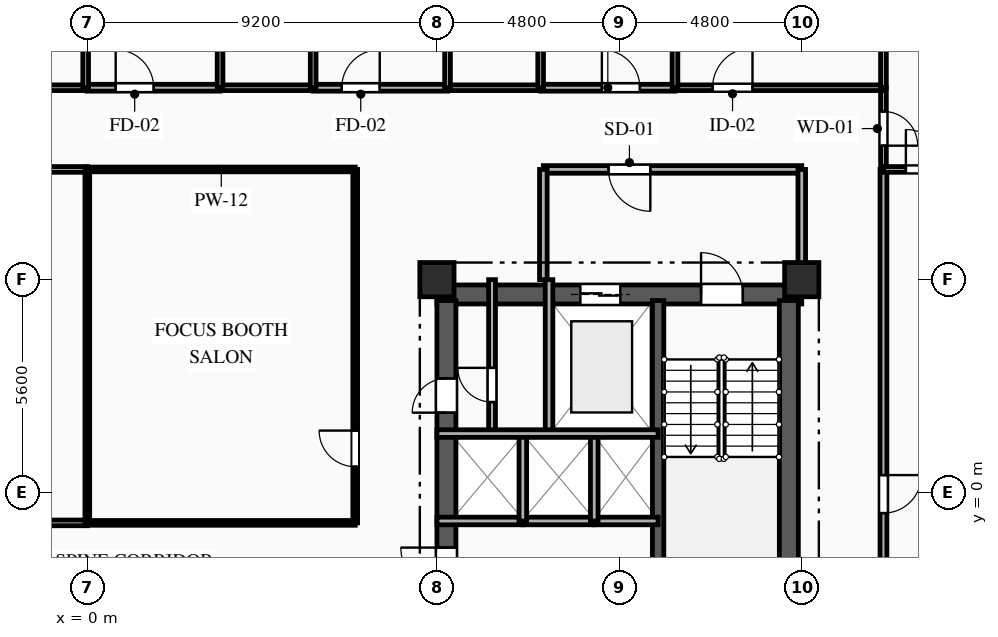
"""IFC4 building model, lengths in metres.
Left out: names, types, materials, properties, quantities, classifications, styles, units other than length and angle.
Written with IfcOpenShell. Run it as: python <this file> out.ifc"""

import sys

from ifc_helpers import new_model, si_unit, direction, frame, frame_2d, origin, origin_2d, place, context, subcontext, project, spatial, rectangle, extrude, element, fill, save


model = new_model("IFC4")
c1 = context("Model", 3, precision=1e-05, world=origin(), true_north=direction((0.0, 1.0)))
c2 = subcontext(c1, "Body", "Model", "MODEL_VIEW")
j1 = project(units=[si_unit("LENGTHUNIT", "METRE"), si_unit("PLANEANGLEUNIT", "RADIAN")], contexts=[c1])
p1 = place(None, origin())
s1 = spatial("IfcSite", under=j1, at=p1, CompositionType="ELEMENT")
p2 = place(p1, origin())
s2 = spatial("IfcBuilding", under=s1, at=p2, CompositionType="ELEMENT")
p3 = place(p2, frame((0.0, 0.0, 141.05)))
s3 = spatial("IfcBuildingStorey", under=s2, at=p3, CompositionType="ELEMENT", Elevation=141.05)
for number, where, z_axis, x_axis in (
    (1, (9.2, 5.6, 0.0), (0.0, 0.0, 1.0), (1.0, 0.0, 0.0)),
    (2, (18.8, 5.6, 0.0), (0.0, 0.0, 1.0), (1.0, 0.0, 0.0)),
):
    element("IfcColumn", number, at=place(p3, frame(where, z_axis=z_axis, x_axis=x_axis)), inside=s3, PredefinedType="COLUMN", context=c2, shape_type="SweptSolid", body=[
        extrude(rectangle(XDim=0.9, YDim=0.9, at=origin_2d()), origin(), (0.0, 0.0, 1.0), 3.35),
    ])
p4 = place(p3, frame((9.2, 5.21, 0.0), z_axis=(0.0, 0.0, 1.0), x_axis=(1.0, 0.0, 0.0)))
e3 = element("IfcWall", 3, at=p4, inside=s3, PredefinedType="SHEAR", context=c2, shape_type="SweptSolid", body=[
    extrude(rectangle(XDim=9.6, YDim=0.5, at=frame_2d((4.8, 0.0))), origin(), (0.0, 0.0, 1.0), 3.04),
])
p5 = place(p4, frame((6.95, 0.0, 0.0)))
e4 = element("IfcOpeningElement", 4, at=p5, cuts=e3, PredefinedType="OPENING", context=c2, shape_type="SweptSolid", body=[
    extrude(rectangle(XDim=1.1, YDim=2.15, at=frame_2d((0.55, 1.075))), frame((0.0, 0.26, 0.0), z_axis=(0.0, -1.0, 0.0), x_axis=(1.0, 0.0, 0.0)), (0.0, 0.0, 1.0), 0.52),
])
p6 = place(p4, frame((3.775, 0.0, 0.0)))
e5 = element("IfcOpeningElement", 5, at=p6, cuts=e3, PredefinedType="OPENING", context=c2, shape_type="SweptSolid", body=[
    extrude(rectangle(XDim=1.05, YDim=2.1, at=frame_2d((0.525, 1.05))), frame((0.0, 0.26, 0.0), z_axis=(0.0, -1.0, 0.0), x_axis=(1.0, 0.0, 0.0)), (0.0, 0.0, 1.0), 0.52),
])
p7 = place(p3, frame((9.45, -5.05, 0.0), z_axis=(0.0, 0.0, 1.0), x_axis=(0.0, 1.0, 0.0)))
e6 = element("IfcWall", 6, at=p7, inside=s3, PredefinedType="SHEAR", context=c2, shape_type="SweptSolid", body=[
    extrude(rectangle(XDim=10.1, YDim=0.5, at=frame_2d((5.05, 0.0))), origin(), (0.0, 0.0, 1.0), 3.04),
])
p8 = place(p7, frame((7.15, 0.0, 0.0)))
e7 = element("IfcOpeningElement", 7, at=p8, cuts=e6, PredefinedType="OPENING", context=c2, shape_type="SweptSolid", body=[
    extrude(rectangle(XDim=0.9, YDim=2.1, at=frame_2d((0.45, 1.05))), frame((0.0, 0.26, 0.0), z_axis=(0.0, -1.0, 0.0), x_axis=(1.0, 0.0, 0.0)), (0.0, 0.0, 1.0), 0.52),
])
p9 = place(p7, frame((2.4, 0.0, 0.0)))
e8 = element("IfcOpeningElement", 8, at=p9, cuts=e6, PredefinedType="OPENING", context=c2, shape_type="SweptSolid", body=[
    extrude(rectangle(XDim=1.2, YDim=2.15, at=frame_2d((0.6, 1.075))), frame((0.0, 0.26, 0.0), z_axis=(0.0, -1.0, 0.0), x_axis=(1.0, 0.0, 0.0)), (0.0, 0.0, 1.0), 0.52),
])
p10 = place(p3, frame((18.46, -5.05, 0.0), z_axis=(0.0, 0.0, 1.0), x_axis=(0.0, 1.0, 0.0)))
e9 = element("IfcWall", 9, at=p10, inside=s3, PredefinedType="SHEAR", context=c2, shape_type="SweptSolid", body=[
    extrude(rectangle(XDim=10.1, YDim=0.5, at=frame_2d((5.05, 0.0))), origin(), (0.0, 0.0, 1.0), 3.04),
])
p11 = place(p3, frame((15.02, -5.05, 0.0), z_axis=(0.0, 0.0, 1.0), x_axis=(0.0, 1.0, 0.0)))
e10 = element("IfcWall", 10, at=p11, inside=s3, PredefinedType="SHEAR", context=c2, shape_type="SweptSolid", body=[
    extrude(rectangle(XDim=10.1, YDim=0.3, at=frame_2d((5.05, 0.0))), origin(), (0.0, 0.0, 1.0), 3.04),
])
p12 = place(p3, frame((12.15, 5.6, 0.0), z_axis=(0.0, 0.0, 1.0), x_axis=(0.0, -1.0, 0.0)))
e11 = element("IfcWall", 11, at=p12, inside=s3, PredefinedType="PARTITIONING", context=c2, shape_type="SweptSolid", body=[
    extrude(rectangle(XDim=4.05, YDim=0.2, at=frame_2d((2.025, 0.0))), origin(), (0.0, 0.0, 1.0), 3.04),
])
p13 = place(p3, frame((18.8, 8.5, 0.0), z_axis=(0.0, 0.0, 1.0), x_axis=(-1.0, 0.0, 0.0)))
e12 = element("IfcWall", 12, at=p13, inside=s3, PredefinedType="PARTITIONING", context=c2, shape_type="SweptSolid", body=[
    extrude(rectangle(XDim=6.8, YDim=0.2, at=frame_2d((3.4, 0.0))), origin(), (0.0, 0.0, 1.0), 3.04),
])
p14 = place(p13, frame((3.985, 0.0, 0.0)))
e13 = element("IfcOpeningElement", 13, at=p14, cuts=e12, PredefinedType="OPENING", context=c2, shape_type="SweptSolid", body=[
    extrude(rectangle(XDim=1.1, YDim=2.15, at=frame_2d((0.55, 1.075))), frame((0.0, 0.11, 0.0), z_axis=(0.0, -1.0, 0.0), x_axis=(1.0, 0.0, 0.0)), (0.0, 0.0, 1.0), 0.22),
])
p15 = place(p3, frame((18.8, 5.6, 0.0), z_axis=(0.0, 0.0, 1.0), x_axis=(0.0, 1.0, 0.0)))
e14 = element("IfcWall", 14, at=p15, inside=s3, PredefinedType="PARTITIONING", context=c2, shape_type="SweptSolid", body=[
    extrude(rectangle(XDim=2.9, YDim=0.2, at=frame_2d((1.45, 0.0))), origin(), (0.0, 0.0, 1.0), 2.525),
])
p16 = place(p3, frame((12.0, 8.5, 0.0), z_axis=(0.0, 0.0, 1.0), x_axis=(0.0, -1.0, 0.0)))
e15 = element("IfcWall", 15, at=p16, inside=s3, PredefinedType="PARTITIONING", context=c2, shape_type="SweptSolid", body=[
    extrude(rectangle(XDim=2.9, YDim=0.2, at=frame_2d((1.45, 0.0))), origin(), (0.0, 0.0, 1.0), 3.04),
])
p17 = place(p3, frame((10.65, 1.55, 0.0), z_axis=(0.0, 0.0, 1.0), x_axis=(0.0, 1.0, 0.0)))
e16 = element("IfcWall", 16, at=p17, inside=s3, PredefinedType="PARTITIONING", context=c2, shape_type="SweptSolid", body=[
    extrude(rectangle(XDim=4.05, YDim=0.18, at=frame_2d((2.025, 0.0))), origin(), (0.0, 0.0, 1.0), 3.04),
])
p18 = place(p17, frame((0.829, 0.0, 0.0)))
e17 = element("IfcOpeningElement", 17, at=p18, cuts=e16, PredefinedType="OPENING", context=c2, shape_type="SweptSolid", body=[
    extrude(rectangle(XDim=0.9, YDim=2.1, at=frame_2d((0.45, 1.05))), frame((0.0, 0.1, 0.0), z_axis=(0.0, -1.0, 0.0), x_axis=(1.0, 0.0, 0.0)), (0.0, 0.0, 1.0), 0.2),
])
p19 = place(p3, frame((11.46, -0.75, 0.0), z_axis=(0.0, 0.0, 1.0), x_axis=(-1.0, 0.0, 0.0)))
e18 = element("IfcWall", 18, at=p19, inside=s3, PredefinedType="PARTITIONING", context=c2, shape_type="SweptSolid", body=[
    extrude(rectangle(XDim=2.26, YDim=0.2, at=frame_2d((1.13, 0.0))), origin(), (0.0, 0.0, 1.0), 3.04),
])
p20 = place(p3, frame((13.34, -0.75, 0.0), z_axis=(0.0, 0.0, 1.0), x_axis=(-1.0, 0.0, 0.0)))
e19 = element("IfcWall", 19, at=p20, inside=s3, PredefinedType="PARTITIONING", context=c2, shape_type="SweptSolid", body=[
    extrude(rectangle(XDim=1.88, YDim=0.2, at=frame_2d((0.94, 0.0))), origin(), (0.0, 0.0, 1.0), 3.04),
])
p21 = place(p3, frame((15.02, -0.75, 0.0), z_axis=(0.0, 0.0, 1.0), x_axis=(-1.0, 0.0, 0.0)))
e20 = element("IfcWall", 20, at=p21, inside=s3, PredefinedType="PARTITIONING", context=c2, shape_type="SweptSolid", body=[
    extrude(rectangle(XDim=1.68, YDim=0.2, at=frame_2d((0.84, 0.0))), origin(), (0.0, 0.0, 1.0), 3.04),
])
for number, where, z_axis, x_axis in (
    (21, (11.46, -0.75, 0.0), (0.0, 0.0, 1.0), (0.0, 1.0, 0.0)),
    (22, (13.34, -0.75, 0.0), (0.0, 0.0, 1.0), (0.0, 1.0, 0.0)),
):
    element("IfcWall", number, at=place(p3, frame(where, z_axis=z_axis, x_axis=x_axis)), inside=s3, PredefinedType="PARTITIONING", context=c2, shape_type="SweptSolid", body=[
        extrude(rectangle(XDim=2.3, YDim=0.2, at=frame_2d((1.15, 0.0))), origin(), (0.0, 0.0, 1.0), 3.04),
    ])
p22 = place(p3, frame((-2.493, 10.65, 0.0), z_axis=(0.0, 0.0, 1.0), x_axis=(1.0, 0.0, 0.0)))
e23 = element("IfcWall", 23, at=p22, inside=s3, PredefinedType="PLUMBINGWALL", context=c2, shape_type="SweptSolid", body=[
    extrude(rectangle(XDim=2.45, YDim=0.15, at=frame_2d((1.225, 0.0))), origin(), (0.0, 0.0, 1.0), 3.04),
])
p23 = place(p3, frame((0.0, 8.5, 0.0), z_axis=(0.0, 0.0, 1.0), x_axis=(-1.0, 0.0, 0.0)))
e24 = element("IfcWall", 24, at=p23, inside=s3, PredefinedType="PARTITIONING", context=c2, shape_type="SweptSolid", body=[
    extrude(rectangle(XDim=7.05, YDim=0.15, at=frame_2d((3.525, 0.0))), origin(), (0.0, 0.0, 1.0), 3.04),
])
p24 = place(p3, frame((20.95, 10.65, 0.0), z_axis=(0.0, 0.0, 1.0), x_axis=(0.0, -1.0, 0.0)))
e25 = element("IfcWall", 25, at=p24, inside=s3, PredefinedType="PARTITIONING", context=c2, shape_type="SweptSolid", body=[
    extrude(rectangle(XDim=2.15, YDim=0.15, at=frame_2d((1.075, 0.0))), origin(), (0.0, 0.0, 1.0), 3.04),
])
p25 = place(p24, frame((0.625, 0.0, 0.0)))
e26 = element("IfcOpeningElement", 26, at=p25, cuts=e25, PredefinedType="OPENING", context=c2, shape_type="SweptSolid", body=[
    extrude(rectangle(XDim=0.9, YDim=2.1, at=frame_2d((0.45, 1.05))), frame((0.0, 0.085, 0.0), z_axis=(0.0, -1.0, 0.0), x_axis=(1.0, 0.0, 0.0)), (0.0, 0.0, 1.0), 0.17),
])
p26 = place(p3, frame((0.0, 10.65, 0.0), z_axis=(0.0, 0.0, 1.0), x_axis=(1.0, 0.0, 0.0)))
e27 = element("IfcWall", 27, at=p26, inside=s3, PredefinedType="PARTITIONING", context=c2, shape_type="SweptSolid", body=[
    extrude(rectangle(XDim=3.493, YDim=0.18, at=frame_2d((1.747, 0.0))), origin(), (0.0, 0.0, 1.0), 3.04),
])
p27 = place(p26, frame((0.747, 0.0, 0.0)))
e28 = element("IfcOpeningElement", 28, at=p27, cuts=e27, PredefinedType="OPENING", context=c2, shape_type="SweptSolid", body=[
    extrude(rectangle(XDim=1.0, YDim=2.15, at=frame_2d((0.5, 1.075))), frame((0.0, 0.1, 0.0), z_axis=(0.0, -1.0, 0.0), x_axis=(1.0, 0.0, 0.0)), (0.0, 0.0, 1.0), 0.2),
])
p28 = place(p3, frame((5.943, 10.65, 0.0), z_axis=(0.0, 0.0, 1.0), x_axis=(1.0, 0.0, 0.0)))
e29 = element("IfcWall", 29, at=p28, inside=s3, PredefinedType="PARTITIONING", context=c2, shape_type="SweptSolid", body=[
    extrude(rectangle(XDim=3.536, YDim=0.18, at=frame_2d((1.768, 0.0))), origin(), (0.0, 0.0, 1.0), 3.04),
])
p29 = place(p28, frame((0.752, 0.0, 0.0)))
e30 = element("IfcOpeningElement", 30, at=p29, cuts=e29, PredefinedType="OPENING", context=c2, shape_type="SweptSolid", body=[
    extrude(rectangle(XDim=1.0, YDim=2.15, at=frame_2d((0.5, 1.075))), frame((0.0, 0.1, 0.0), z_axis=(0.0, -1.0, 0.0), x_axis=(1.0, 0.0, 0.0)), (0.0, 0.0, 1.0), 0.2),
])
p30 = place(p3, frame((3.493, 10.65, 0.0), z_axis=(0.0, 0.0, 1.0), x_axis=(1.0, 0.0, 0.0)))
e31 = element("IfcWall", 31, at=p30, inside=s3, PredefinedType="PLUMBINGWALL", context=c2, shape_type="SweptSolid", body=[
    extrude(rectangle(XDim=2.45, YDim=0.15, at=frame_2d((1.225, 0.0))), origin(), (0.0, 0.0, 1.0), 3.04),
])
p31 = place(p3, frame((11.929, 10.65, 0.0), z_axis=(0.0, 0.0, 1.0), x_axis=(1.0, 0.0, 0.0)))
e32 = element("IfcWall", 32, at=p31, inside=s3, PredefinedType="PARTITIONING", context=c2, shape_type="SweptSolid", body=[
    extrude(rectangle(XDim=3.535, YDim=0.18, at=frame_2d((1.768, 0.0))), origin(), (0.0, 0.0, 1.0), 3.04),
])
p32 = place(p31, frame((1.611, 0.0, 0.0)))
e33 = element("IfcOpeningElement", 33, at=p32, cuts=e32, PredefinedType="OPENING", context=c2, shape_type="SweptSolid", body=[
    extrude(rectangle(XDim=1.0, YDim=2.15, at=frame_2d((0.5, 1.075))), frame((0.0, 0.1, 0.0), z_axis=(0.0, -1.0, 0.0), x_axis=(1.0, 0.0, 0.0)), (0.0, 0.0, 1.0), 0.2),
])
p33 = place(p3, frame((9.479, 10.65, 0.0), z_axis=(0.0, 0.0, 1.0), x_axis=(1.0, 0.0, 0.0)))
e34 = element("IfcWall", 34, at=p33, inside=s3, PredefinedType="PLUMBINGWALL", context=c2, shape_type="SweptSolid", body=[
    extrude(rectangle(XDim=2.45, YDim=0.15, at=frame_2d((1.225, 0.0))), origin(), (0.0, 0.0, 1.0), 3.04),
])
p34 = place(p3, frame((15.464, 10.65, 0.0), z_axis=(0.0, 0.0, 1.0), x_axis=(1.0, 0.0, 0.0)))
e35 = element("IfcWall", 35, at=p34, inside=s3, PredefinedType="PARTITIONING", context=c2, shape_type="SweptSolid", body=[
    extrude(rectangle(XDim=5.486, YDim=0.15, at=frame_2d((2.743, 0.0))), origin(), (0.0, 0.0, 1.0), 3.04),
])
p35 = place(p34, frame((0.99, 0.0, 0.0)))
e36 = element("IfcOpeningElement", 36, at=p35, cuts=e35, PredefinedType="OPENING", context=c2, shape_type="SweptSolid", body=[
    extrude(rectangle(XDim=1.05, YDim=2.15, at=frame_2d((0.525, 1.075))), frame((0.0, 0.085, 0.0), z_axis=(0.0, -1.0, 0.0), x_axis=(1.0, 0.0, 0.0)), (0.0, 0.0, 1.0), 0.17),
])
p36 = place(p3, frame((7.05, 8.5, 0.0), z_axis=(0.0, 0.0, 1.0), x_axis=(-1.0, 0.0, 0.0)))
e37 = element("IfcWall", 37, at=p36, inside=s3, PredefinedType="PARTITIONING", context=c2, shape_type="SweptSolid", body=[
    extrude(rectangle(XDim=7.05, YDim=0.125, at=frame_2d((3.525, 0.0))), origin(), (0.0, 0.0, 1.0), 3.04),
])
p37 = place(p3, frame((20.95, 8.5, 0.0), z_axis=(0.0, 0.0, 1.0), x_axis=(0.0, -1.0, 0.0)))
e38 = element("IfcWall", 38, at=p37, inside=s3, PredefinedType="PARTITIONING", context=c2, shape_type="SweptSolid", body=[
    extrude(rectangle(XDim=14.1, YDim=0.18, at=frame_2d((7.05, 0.0))), origin(), (0.0, 0.0, 1.0), 3.04),
])
p38 = place(p37, frame((8.042, 0.0, 0.0)))
e39 = element("IfcOpeningElement", 39, at=p38, cuts=e38, PredefinedType="OPENING", context=c2, shape_type="SweptSolid", body=[
    extrude(rectangle(XDim=1.0, YDim=2.15, at=frame_2d((0.5, 1.075))), frame((0.0, 0.1, 0.0), z_axis=(0.0, -1.0, 0.0), x_axis=(1.0, 0.0, 0.0)), (0.0, 0.0, 1.0), 0.2),
])
p39 = place(p3, frame((-7.05, -0.8, 0.0), z_axis=(0.0, 0.0, 1.0), x_axis=(1.0, 0.0, 0.0)))
e40 = element("IfcWall", 40, at=p39, inside=s3, PredefinedType="PARTITIONING", context=c2, shape_type="SweptSolid", body=[
    extrude(rectangle(XDim=7.05, YDim=0.15, at=frame_2d((3.525, 0.0))), origin(), (0.0, 0.0, 1.0), 3.04),
])
p40 = place(p3, frame((0.0, -0.8, 0.0), z_axis=(0.0, 0.0, 1.0), x_axis=(1.0, 0.0, 0.0)))
e41 = element("IfcWall", 41, at=p40, inside=s3, PredefinedType="PARTITIONING", context=c2, shape_type="SweptSolid", body=[
    extrude(rectangle(XDim=7.05, YDim=0.125, at=frame_2d((3.525, 0.0))), origin(), (0.0, 0.0, 1.0), 3.04),
])
p41 = place(p3, frame((7.05, -0.8, 0.0), z_axis=(0.0, 0.0, 1.0), x_axis=(0.0, 1.0, 0.0)))
e42 = element("IfcWall", 42, at=p41, inside=s3, PredefinedType="PARTITIONING", context=c2, shape_type="SweptSolid", body=[
    extrude(rectangle(XDim=9.3, YDim=0.125, at=frame_2d((4.65, 0.0))), origin(), (0.0, 0.0, 1.0), 3.04),
])
p42 = place(p41, frame((1.479, 0.0, 0.0)))
e43 = element("IfcOpeningElement", 43, at=p42, cuts=e42, PredefinedType="OPENING", context=c2, shape_type="SweptSolid", body=[
    extrude(rectangle(XDim=0.95, YDim=2.1, at=frame_2d((0.475, 1.05))), frame((0.0, 0.073, 0.0), z_axis=(0.0, -1.0, 0.0), x_axis=(1.0, 0.0, 0.0)), (0.0, 0.0, 1.0), 0.145),
])
p43 = place(p3, frame((20.95, 8.5, 0.0), z_axis=(0.0, 0.0, 1.0), x_axis=(1.0, 0.0, 0.0)))
e44 = element("IfcWall", 44, at=p43, inside=s3, PredefinedType="PARTITIONING", context=c2, shape_type="SweptSolid", body=[
    extrude(rectangle(XDim=2.23, YDim=0.15, at=frame_2d((1.115, 0.0))), origin(), (0.0, 0.0, 1.0), 3.04),
])
p44 = place(p43, frame((0.59, 0.0, 0.0)))
e45 = element("IfcOpeningElement", 45, at=p44, cuts=e44, PredefinedType="OPENING", context=c2, shape_type="SweptSolid", body=[
    extrude(rectangle(XDim=1.05, YDim=2.15, at=frame_2d((0.525, 1.075))), frame((0.0, 0.085, 0.0), z_axis=(0.0, -1.0, 0.0), x_axis=(1.0, 0.0, 0.0)), (0.0, 0.0, 1.0), 0.17),
])
p45 = place(p3, frame((20.95, 10.65, 0.0), z_axis=(0.0, 0.0, 1.0), x_axis=(0.0, 1.0, 0.0)))
e46 = element("IfcWall", 46, at=p45, inside=s3, PredefinedType="PARTITIONING", context=c2, shape_type="SweptSolid", body=[
    extrude(rectangle(XDim=9.75, YDim=0.15, at=frame_2d((4.875, 0.0))), origin(), (0.0, 0.0, 1.0), 2.525),
])
for number, where, z_axis, x_axis in (
    (47, (-0.043, 10.65, 0.0), (0.0, 0.0, 1.0), (0.0, 1.0, 0.0)),
    (48, (3.493, 12.8, 0.0), (0.0, 0.0, 1.0), (0.0, -1.0, 0.0)),
    (49, (5.943, 10.65, 0.0), (0.0, 0.0, 1.0), (0.0, 1.0, 0.0)),
    (50, (9.479, 12.8, 0.0), (0.0, 0.0, 1.0), (0.0, -1.0, 0.0)),
    (51, (11.929, 10.65, 0.0), (0.0, 0.0, 1.0), (0.0, 1.0, 0.0)),
):
    element("IfcWall", number, at=place(p3, frame(where, z_axis=z_axis, x_axis=x_axis)), inside=s3, PredefinedType="PLUMBINGWALL", context=c2, shape_type="SweptSolid", body=[
        extrude(rectangle(XDim=2.15, YDim=0.15, at=frame_2d((1.075, 0.0))), origin(), (0.0, 0.0, 1.0), 3.04),
    ])
p46 = place(p3, frame((15.464, 20.4, 0.0), z_axis=(0.0, 0.0, 1.0), x_axis=(0.0, -1.0, 0.0)))
e52 = element("IfcWall", 52, at=p46, inside=s3, PredefinedType="PARTITIONING", context=c2, shape_type="SweptSolid", body=[
    extrude(rectangle(XDim=9.75, YDim=0.15, at=frame_2d((4.875, 0.0))), origin(), (0.0, 0.0, 1.0), 2.525),
])
p47 = place(p3, frame((0.0, 8.5, 0.0), z_axis=(0.0, 0.0, 1.0), x_axis=(0.0, -1.0, 0.0)))
e53 = element("IfcWall", 53, at=p47, inside=s3, PredefinedType="PARTITIONING", context=c2, shape_type="SweptSolid", body=[
    extrude(rectangle(XDim=9.3, YDim=0.125, at=frame_2d((4.65, 0.0))), origin(), (0.0, 0.0, 1.0), 3.04),
])
p48 = place(p3, frame((9.2, 1.55, 0.0), z_axis=(0.0, 0.0, 1.0), x_axis=(1.0, 0.0, 0.0)))
e54 = element("IfcWall", 54, at=p48, inside=s3, PredefinedType="PARTITIONING", context=c2, shape_type="SweptSolid", body=[
    extrude(rectangle(XDim=5.82, YDim=0.2, at=frame_2d((2.91, 0.0))), origin(), (0.0, 0.0, 1.0), 3.04),
])
p49 = place(p5, origin())
e55 = element("IfcDoor", 55, at=p49, inside=s3, OperationType="SINGLE_SWING_LEFT", PredefinedType="DOOR", context=c2, shape_type="SweptSolid", body=[
    extrude(rectangle(XDim=1.1, YDim=2.15, at=frame_2d((0.55, 1.075))), frame((0.0, 0.025, 0.0), z_axis=(0.0, -1.0, 0.0), x_axis=(1.0, 0.0, 0.0)), (0.0, 0.0, 1.0), 0.05),
])
fill(e4, e55)
p50 = place(p6, origin())
e56 = element("IfcDoor", 56, at=p50, inside=s3, OperationType="DOUBLE_DOOR_SLIDING", PredefinedType="DOOR", context=c2, shape_type="SweptSolid", body=[
    extrude(rectangle(XDim=1.05, YDim=2.1, at=frame_2d((0.525, 1.05))), frame((0.0, 0.025, 0.0), z_axis=(0.0, -1.0, 0.0), x_axis=(1.0, 0.0, 0.0)), (0.0, 0.0, 1.0), 0.05),
])
fill(e5, e56)
p51 = place(p14, origin())
e57 = element("IfcDoor", 57, at=p51, inside=s3, OperationType="SINGLE_SWING_LEFT", PredefinedType="DOOR", context=c2, shape_type="SweptSolid", body=[
    extrude(rectangle(XDim=1.1, YDim=2.15, at=frame_2d((0.55, 1.075))), frame((0.0, 0.025, 0.0), z_axis=(0.0, -1.0, 0.0), x_axis=(1.0, 0.0, 0.0)), (0.0, 0.0, 1.0), 0.05),
])
fill(e13, e57)
p52 = place(p18, origin())
e58 = element("IfcDoor", 58, at=p52, inside=s3, OperationType="SINGLE_SWING_RIGHT", PredefinedType="DOOR", context=c2, shape_type="SweptSolid", body=[
    extrude(rectangle(XDim=0.9, YDim=2.1, at=frame_2d((0.45, 1.05))), frame((0.0, 0.025, 0.0), z_axis=(0.0, -1.0, 0.0), x_axis=(1.0, 0.0, 0.0)), (0.0, 0.0, 1.0), 0.05),
])
fill(e17, e58)
p53 = place(p8, origin())
e59 = element("IfcDoor", 59, at=p53, inside=s3, OperationType="SINGLE_SWING_LEFT", PredefinedType="DOOR", context=c2, shape_type="SweptSolid", body=[
    extrude(rectangle(XDim=0.9, YDim=2.1, at=frame_2d((0.45, 1.05))), frame((0.0, 0.025, 0.0), z_axis=(0.0, -1.0, 0.0), x_axis=(1.0, 0.0, 0.0)), (0.0, 0.0, 1.0), 0.05),
])
fill(e7, e59)
p54 = place(p9, origin())
e60 = element("IfcDoor", 60, at=p54, inside=s3, OperationType="SINGLE_SWING_RIGHT", PredefinedType="DOOR", context=c2, shape_type="SweptSolid", body=[
    extrude(rectangle(XDim=1.2, YDim=2.15, at=frame_2d((0.6, 1.075))), frame((0.0, 0.025, 0.0), z_axis=(0.0, -1.0, 0.0), x_axis=(1.0, 0.0, 0.0)), (0.0, 0.0, 1.0), 0.05),
])
fill(e8, e60)
p55 = place(p25, origin())
e61 = element("IfcDoor", 61, at=p55, inside=s3, OperationType="SINGLE_SWING_RIGHT", PredefinedType="DOOR", context=c2, shape_type="SweptSolid", body=[
    extrude(rectangle(XDim=0.9, YDim=2.1, at=frame_2d((0.45, 1.05))), frame((0.0, 0.025, 0.0), z_axis=(0.0, -1.0, 0.0), x_axis=(1.0, 0.0, 0.0)), (0.0, 0.0, 1.0), 0.05),
])
fill(e26, e61)
p56 = place(p27, origin())
e62 = element("IfcDoor", 62, at=p56, inside=s3, OperationType="SINGLE_SWING_LEFT", PredefinedType="DOOR", context=c2, shape_type="SweptSolid", body=[
    extrude(rectangle(XDim=1.0, YDim=2.15, at=frame_2d((0.5, 1.075))), frame((0.0, 0.025, 0.0), z_axis=(0.0, -1.0, 0.0), x_axis=(1.0, 0.0, 0.0)), (0.0, 0.0, 1.0), 0.05),
])
fill(e28, e62)
p57 = place(p29, origin())
e63 = element("IfcDoor", 63, at=p57, inside=s3, OperationType="SINGLE_SWING_RIGHT", PredefinedType="DOOR", context=c2, shape_type="SweptSolid", body=[
    extrude(rectangle(XDim=1.0, YDim=2.15, at=frame_2d((0.5, 1.075))), frame((0.0, 0.025, 0.0), z_axis=(0.0, -1.0, 0.0), x_axis=(1.0, 0.0, 0.0)), (0.0, 0.0, 1.0), 0.05),
])
fill(e30, e63)
p58 = place(p32, origin())
e64 = element("IfcDoor", 64, at=p58, inside=s3, OperationType="SINGLE_SWING_LEFT", PredefinedType="DOOR", context=c2, shape_type="SweptSolid", body=[
    extrude(rectangle(XDim=1.0, YDim=2.15, at=frame_2d((0.5, 1.075))), frame((0.0, 0.025, 0.0), z_axis=(0.0, -1.0, 0.0), x_axis=(1.0, 0.0, 0.0)), (0.0, 0.0, 1.0), 0.05),
])
fill(e33, e64)
p59 = place(p35, origin())
e65 = element("IfcDoor", 65, at=p59, inside=s3, OperationType="SINGLE_SWING_RIGHT", PredefinedType="DOOR", context=c2, shape_type="SweptSolid", body=[
    extrude(rectangle(XDim=1.05, YDim=2.15, at=frame_2d((0.525, 1.075))), frame((0.0, 0.025, 0.0), z_axis=(0.0, -1.0, 0.0), x_axis=(1.0, 0.0, 0.0)), (0.0, 0.0, 1.0), 0.05),
])
fill(e36, e65)
p60 = place(p38, origin())
e66 = element("IfcDoor", 66, at=p60, inside=s3, OperationType="SINGLE_SWING_LEFT", PredefinedType="DOOR", context=c2, shape_type="SweptSolid", body=[
    extrude(rectangle(XDim=1.0, YDim=2.15, at=frame_2d((0.5, 1.075))), frame((0.0, 0.025, 0.0), z_axis=(0.0, -1.0, 0.0), x_axis=(1.0, 0.0, 0.0)), (0.0, 0.0, 1.0), 0.05),
])
fill(e39, e66)
p61 = place(p42, origin())
e67 = element("IfcDoor", 67, at=p61, inside=s3, OperationType="SINGLE_SWING_RIGHT", PredefinedType="DOOR", context=c2, shape_type="SweptSolid", body=[
    extrude(rectangle(XDim=0.95, YDim=2.1, at=frame_2d((0.475, 1.05))), frame((0.0, 0.025, 0.0), z_axis=(0.0, -1.0, 0.0), x_axis=(1.0, 0.0, 0.0)), (0.0, 0.0, 1.0), 0.05),
])
fill(e43, e67)
p62 = place(p44, origin())
e68 = element("IfcDoor", 68, at=p62, inside=s3, OperationType="SINGLE_SWING_LEFT", PredefinedType="DOOR", context=c2, shape_type="SweptSolid", body=[
    extrude(rectangle(XDim=1.05, YDim=2.15, at=frame_2d((0.525, 1.075))), frame((0.0, 0.025, 0.0), z_axis=(0.0, -1.0, 0.0), x_axis=(1.0, 0.0, 0.0)), (0.0, 0.0, 1.0), 0.05),
])
fill(e45, e68)
save(model, sys.argv[1])
